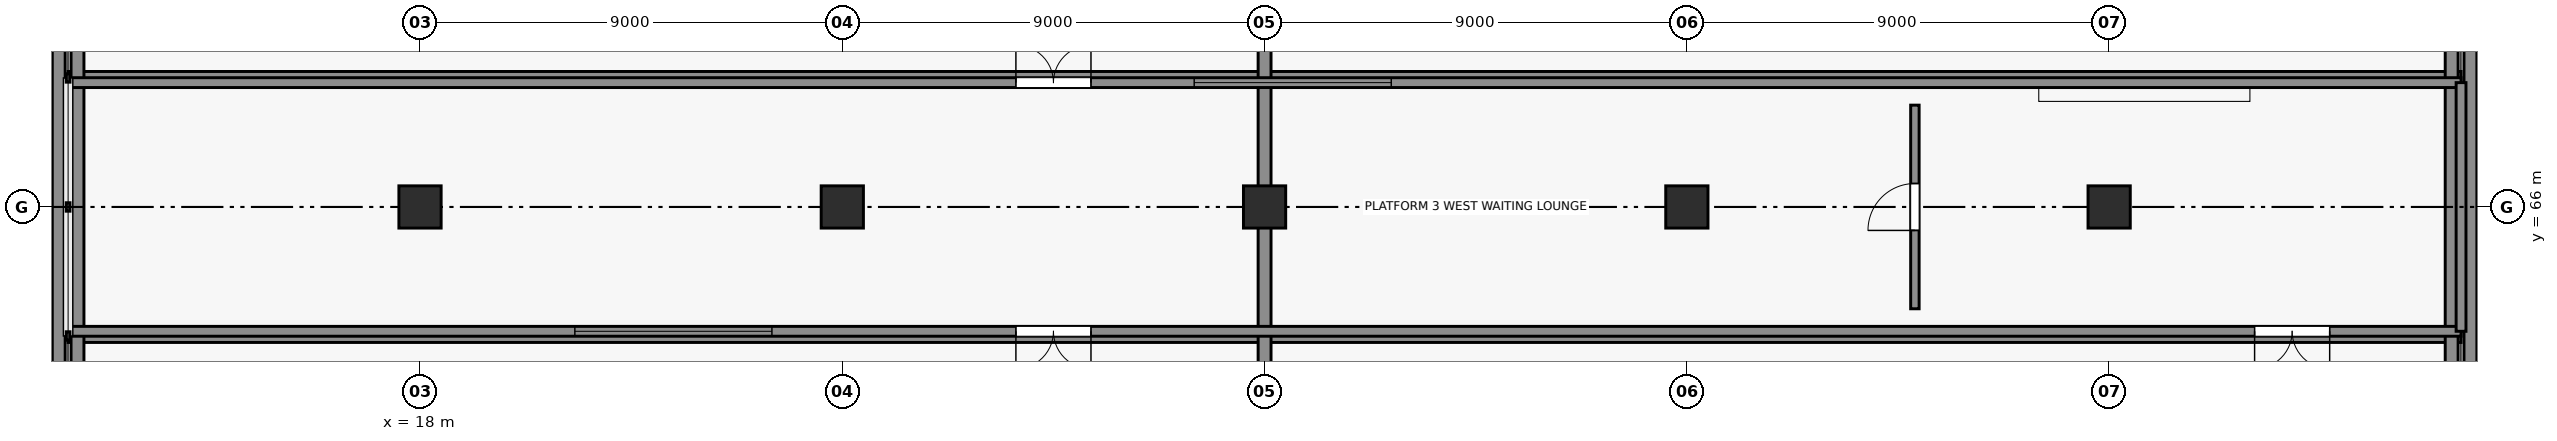
"""IFC4 building model, lengths in metres.
Left out: names, types, materials, properties, quantities, classifications, styles, units other than length and angle.
Written with IfcOpenShell. Run it as: python <this file> out.ifc"""

import sys

from ifc_helpers import new_model, si_unit, direction, frame, frame_2d, origin, origin_2d, place, context, subcontext, project, spatial, rectangle, extrude, element, fill, save


model = new_model("IFC4")
c1 = context("Model", 3, precision=1e-05, world=origin(), true_north=direction((0.0, 1.0)))
c2 = subcontext(c1, "Body", "Model", "MODEL_VIEW")
j1 = project(units=[si_unit("LENGTHUNIT", "METRE"), si_unit("PLANEANGLEUNIT", "RADIAN")], contexts=[c1])
p1 = place(None, origin())
s1 = spatial("IfcSite", under=j1, at=p1, CompositionType="ELEMENT")
p2 = place(p1, origin())
s2 = spatial("IfcBuilding", under=s1, at=p2, CompositionType="ELEMENT")
p3 = place(p2, origin())
s3 = spatial("IfcBuildingStorey", under=s2, at=p3, CompositionType="ELEMENT", Elevation=0.0)
for number, where, z_axis, x_axis in (
    (1, (10.5, 63.25, 0.0), (0.0, 0.0, 1.0), (1.0, 0.0, 0.0)),
    (2, (10.5, 68.75, 0.0), (0.0, 0.0, 1.0), (1.0, 0.0, 0.0)),
):
    element("IfcWall", number, at=place(p3, frame(where, z_axis=z_axis, x_axis=x_axis)), inside=s3, PredefinedType="SOLIDWALL", context=c2, shape_type="SweptSolid", body=[
        extrude(rectangle(XDim=51.0, YDim=0.275, at=frame_2d((25.5, 0.0))), origin(), (0.0, 0.0, 1.0), 0.675),
    ])
for number, where, z_axis, x_axis in (
    (3, (10.3, 62.25, 0.0), (0.0, 0.0, 1.0), (0.0, 1.0, 0.0)),
    (4, (10.7, 62.25, 0.0), (0.0, 0.0, 1.0), (0.0, 1.0, 0.0)),
    (5, (36.0, 62.25, 0.0), (0.0, 0.0, 1.0), (0.0, 1.0, 0.0)),
    (6, (61.3, 62.25, 0.0), (0.0, 0.0, 1.0), (0.0, 1.0, 0.0)),
    (7, (61.7, 62.25, 0.0), (0.0, 0.0, 1.0), (0.0, 1.0, 0.0)),
):
    element("IfcWall", number, at=place(p3, frame(where, z_axis=z_axis, x_axis=x_axis)), inside=s3, PredefinedType="SOLIDWALL", context=c2, shape_type="SweptSolid", body=[
        extrude(rectangle(XDim=7.5, YDim=0.275, at=frame_2d((3.75, 0.0))), origin(), (0.0, 0.0, 1.0), 0.675),
    ])
for number, where, z_axis, x_axis in (
    (8, (18.0, 66.0, 0.0), (0.0, 0.0, 1.0), (1.0, 0.0, 0.0)),
    (9, (27.0, 66.0, 0.0), (0.0, 0.0, 1.0), (1.0, 0.0, 0.0)),
    (10, (36.0, 66.0, 0.0), (0.0, 0.0, 1.0), (1.0, 0.0, 0.0)),
    (11, (45.0, 66.0, 0.0), (0.0, 0.0, 1.0), (1.0, 0.0, 0.0)),
    (12, (54.0, 66.0, 0.0), (0.0, 0.0, 1.0), (1.0, 0.0, 0.0)),
):
    element("IfcColumn", number, at=place(p3, frame(where, z_axis=z_axis, x_axis=x_axis)), inside=s3, PredefinedType="COLUMN", context=c2, shape_type="SweptSolid", body=[
        extrude(rectangle(XDim=0.9, YDim=0.9, at=origin_2d()), origin(), (0.0, 0.0, 1.0), 4.8),
    ])
p4 = place(p3, frame((61.5, 63.35, 0.915), z_axis=(0.0, 0.0, 1.0), x_axis=(-1.0, 0.0, 0.0)))
e13 = element("IfcWall", 13, at=p4, inside=s3, PredefinedType="SOLIDWALL", context=c2, shape_type="SweptSolid", body=[
    extrude(rectangle(XDim=51.0, YDim=0.21, at=frame_2d((25.5, 0.0))), origin(), (0.0, 0.0, 1.0), 3.185),
])
p5 = place(p4, frame((29.2, 0.0, 0.0)))
e14 = element("IfcOpeningElement", 14, at=p5, cuts=e13, PredefinedType="OPENING", context=c2, shape_type="SweptSolid", body=[
    extrude(rectangle(XDim=1.6, YDim=2.3, at=frame_2d((0.8, 1.15))), frame((0.0, 0.115, 0.0), z_axis=(0.0, -1.0, 0.0), x_axis=(1.0, 0.0, 0.0)), (0.0, 0.0, 1.0), 0.23),
])
p6 = place(p4, frame((2.8, 0.0, 0.0)))
e15 = element("IfcOpeningElement", 15, at=p6, cuts=e13, PredefinedType="OPENING", context=c2, shape_type="SweptSolid", body=[
    extrude(rectangle(XDim=1.6, YDim=2.3, at=frame_2d((0.8, 1.15))), frame((0.0, 0.115, 0.0), z_axis=(0.0, -1.0, 0.0), x_axis=(1.0, 0.0, 0.0)), (0.0, 0.0, 1.0), 0.23),
])
p7 = place(p4, frame((36.0, 0.0, 0.9)))
e16 = element("IfcOpeningElement", 16, at=p7, cuts=e13, PredefinedType="OPENING", context=c2, shape_type="SweptSolid", body=[
    extrude(rectangle(XDim=4.2, YDim=1.5, at=frame_2d((2.1, 0.75))), frame((0.0, 0.115, 0.0), z_axis=(0.0, -1.0, 0.0), x_axis=(1.0, 0.0, 0.0)), (0.0, 0.0, 1.0), 0.23),
])
p8 = place(p3, frame((10.5, 68.65, 0.915), z_axis=(0.0, 0.0, 1.0), x_axis=(1.0, 0.0, 0.0)))
e17 = element("IfcWall", 17, at=p8, inside=s3, PredefinedType="SOLIDWALL", context=c2, shape_type="SweptSolid", body=[
    extrude(rectangle(XDim=51.0, YDim=0.21, at=frame_2d((25.5, 0.0))), origin(), (0.0, 0.0, 1.0), 3.185),
])
p9 = place(p8, frame((20.2, 0.0, 0.0)))
e18 = element("IfcOpeningElement", 18, at=p9, cuts=e17, PredefinedType="OPENING", context=c2, shape_type="SweptSolid", body=[
    extrude(rectangle(XDim=1.6, YDim=2.3, at=frame_2d((0.8, 1.15))), frame((0.0, 0.115, 0.0), z_axis=(0.0, -1.0, 0.0), x_axis=(1.0, 0.0, 0.0)), (0.0, 0.0, 1.0), 0.23),
])
p10 = place(p8, frame((24.0, 0.0, 0.9)))
e19 = element("IfcOpeningElement", 19, at=p10, cuts=e17, PredefinedType="OPENING", context=c2, shape_type="SweptSolid", body=[
    extrude(rectangle(XDim=4.2, YDim=1.5, at=frame_2d((2.1, 0.75))), frame((0.0, 0.115, 0.0), z_axis=(0.0, -1.0, 0.0), x_axis=(1.0, 0.0, 0.0)), (0.0, 0.0, 1.0), 0.23),
])
p11 = place(p3, frame((61.5, 68.65, 0.915), z_axis=(0.0, 0.0, 1.0), x_axis=(0.0, -1.0, 0.0)))
e20 = element("IfcWall", 20, at=p11, inside=s3, PredefinedType="SOLIDWALL", context=c2, shape_type="SweptSolid", body=[
    extrude(rectangle(XDim=5.3, YDim=0.21, at=frame_2d((2.65, 0.0))), origin(), (0.0, 0.0, 1.0), 3.185),
])
p12 = place(p3, frame((49.86, 63.83, 0.915), z_axis=(0.0, 0.0, 1.0), x_axis=(0.0, 1.0, 0.0)))
e21 = element("IfcWall", 21, at=p12, inside=s3, PredefinedType="PARTITIONING", context=c2, shape_type="SweptSolid", body=[
    extrude(rectangle(XDim=4.34, YDim=0.18, at=frame_2d((2.17, 0.0))), origin(), (0.0, 0.0, 1.0), 3.435),
])
p13 = place(p12, frame((1.67, 0.0, 0.0)))
e22 = element("IfcOpeningElement", 22, at=p13, cuts=e21, PredefinedType="OPENING", context=c2, shape_type="SweptSolid", body=[
    extrude(rectangle(XDim=1.0, YDim=2.15, at=frame_2d((0.5, 1.075))), frame((0.0, 0.1, 0.0), z_axis=(0.0, -1.0, 0.0), x_axis=(1.0, 0.0, 0.0)), (0.0, 0.0, 1.0), 0.2),
])
p14 = place(p5, origin())
e23 = element("IfcDoor", 23, at=p14, inside=s3, OperationType="DOUBLE_DOOR_SINGLE_SWING", PredefinedType="DOOR", context=c2, shape_type="SweptSolid", body=[
    extrude(rectangle(XDim=1.6, YDim=2.3, at=frame_2d((0.8, 1.15))), frame((0.0, 0.025, 0.0), z_axis=(0.0, -1.0, 0.0), x_axis=(1.0, 0.0, 0.0)), (0.0, 0.0, 1.0), 0.05),
])
fill(e14, e23)
p15 = place(p6, origin())
e24 = element("IfcDoor", 24, at=p15, inside=s3, OperationType="DOUBLE_DOOR_SINGLE_SWING", PredefinedType="DOOR", context=c2, shape_type="SweptSolid", body=[
    extrude(rectangle(XDim=1.6, YDim=2.3, at=frame_2d((0.8, 1.15))), frame((0.0, 0.025, 0.0), z_axis=(0.0, -1.0, 0.0), x_axis=(1.0, 0.0, 0.0)), (0.0, 0.0, 1.0), 0.05),
])
fill(e15, e24)
p16 = place(p9, origin())
e25 = element("IfcDoor", 25, at=p16, inside=s3, OperationType="DOUBLE_DOOR_SINGLE_SWING", PredefinedType="DOOR", context=c2, shape_type="SweptSolid", body=[
    extrude(rectangle(XDim=1.6, YDim=2.3, at=frame_2d((0.8, 1.15))), frame((0.0, 0.025, 0.0), z_axis=(0.0, -1.0, 0.0), x_axis=(1.0, 0.0, 0.0)), (0.0, 0.0, 1.0), 0.05),
])
fill(e18, e25)
p17 = place(p7, origin())
e26 = element("IfcWindow", 26, at=p17, inside=s3, PartitioningType="SINGLE_PANEL", PredefinedType="WINDOW", context=c2, shape_type="SweptSolid", body=[
    extrude(rectangle(XDim=4.2, YDim=1.5, at=frame_2d((2.1, 0.75))), frame((0.0, 0.03, 0.0), z_axis=(0.0, -1.0, 0.0), x_axis=(1.0, 0.0, 0.0)), (0.0, 0.0, 1.0), 0.06),
])
fill(e16, e26)
p18 = place(p10, origin())
e27 = element("IfcWindow", 27, at=p18, inside=s3, PartitioningType="SINGLE_PANEL", PredefinedType="WINDOW", context=c2, shape_type="SweptSolid", body=[
    extrude(rectangle(XDim=4.2, YDim=1.5, at=frame_2d((2.1, 0.75))), frame((0.0, 0.03, 0.0), z_axis=(0.0, -1.0, 0.0), x_axis=(1.0, 0.0, 0.0)), (0.0, 0.0, 1.0), 0.06),
])
fill(e19, e27)
p19 = place(p13, origin())
e28 = element("IfcDoor", 28, at=p19, inside=s3, OperationType="SINGLE_SWING_LEFT", PredefinedType="DOOR", context=c2, shape_type="SweptSolid", body=[
    extrude(rectangle(XDim=1.0, YDim=2.15, at=frame_2d((0.5, 1.075))), frame((0.0, 0.025, 0.0), z_axis=(0.0, -1.0, 0.0), x_axis=(1.0, 0.0, 0.0)), (0.0, 0.0, 1.0), 0.05),
])
fill(e22, e28)
save(model, sys.argv[1])
